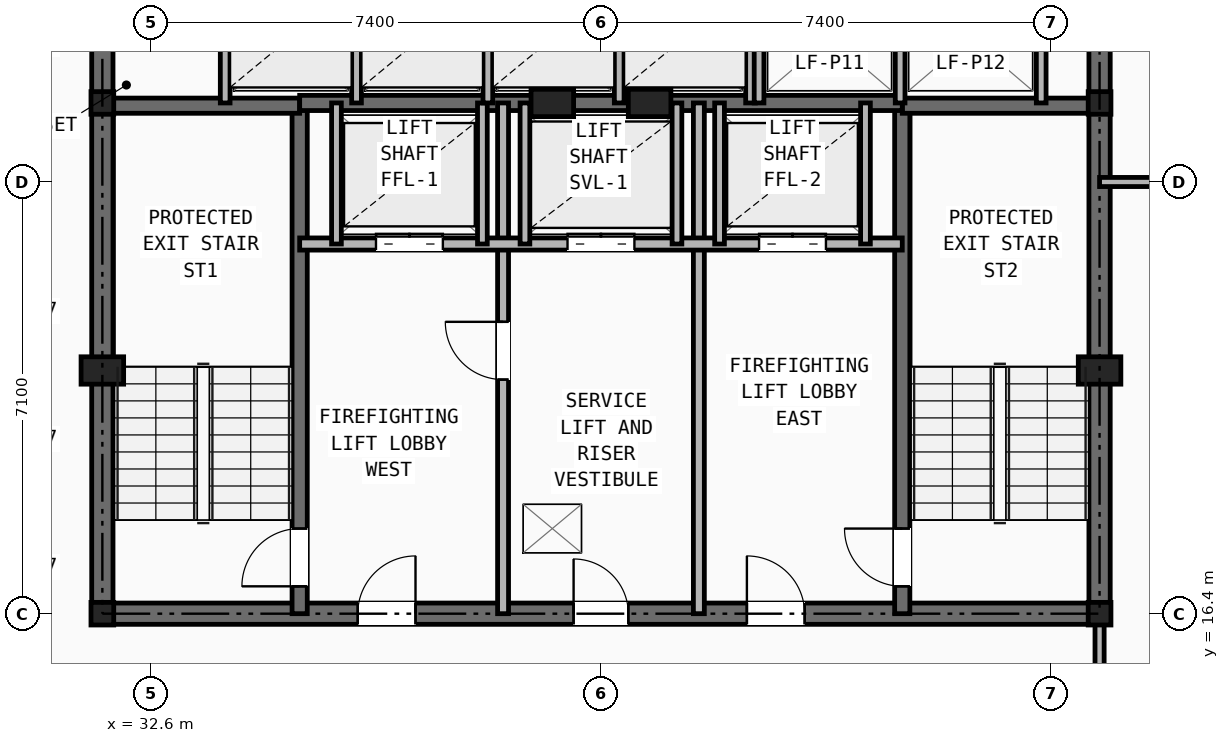
"""IFC4 building model, lengths in metres.
Left out: names, types, materials, properties, quantities, classifications, styles, units other than length and angle.
Written with IfcOpenShell. Run it as: python <this file> out.ifc"""

import sys

from ifc_helpers import new_model, si_unit, direction, frame, frame_2d, origin, origin_2d, place, context, subcontext, project, spatial, rectangle, i_section, extrude, element, fill, save


model = new_model("IFC4")
c1 = context("Model", 3, precision=1e-05, world=origin(), true_north=direction((0.0, 1.0)))
c2 = subcontext(c1, "Body", "Model", "MODEL_VIEW")
j1 = project(units=[si_unit("LENGTHUNIT", "METRE"), si_unit("PLANEANGLEUNIT", "RADIAN")], contexts=[c1])
p1 = place(None, origin())
s1 = spatial("IfcSite", under=j1, at=p1, CompositionType="ELEMENT")
p2 = place(p1, origin())
s2 = spatial("IfcBuilding", under=s1, at=p2, CompositionType="ELEMENT")
p3 = place(p2, frame((0.0, 0.0, 143.6)))
s3 = spatial("IfcBuildingStorey", under=s2, at=p3, CompositionType="ELEMENT", Elevation=143.6)
for number, where, z_axis, x_axis in (
    (1, (31.8, 16.4, 0.0), (0.0, 0.0, 1.0), (1.0, 0.0, 0.0)),
    (2, (48.2, 16.4, 0.0), (0.0, 0.0, 1.0), (1.0, 0.0, 0.0)),
    (3, (31.8, 24.8, 0.0), (0.0, 0.0, 1.0), (1.0, 0.0, 0.0)),
    (4, (48.2, 24.8, 0.0), (0.0, 0.0, 1.0), (1.0, 0.0, 0.0)),
):
    element("IfcColumn", number, at=place(p3, frame(where, z_axis=z_axis, x_axis=x_axis)), inside=s3, PredefinedType="COLUMN", context=c2, shape_type="SweptSolid", body=[
        extrude(i_section(OverallWidth=0.374, OverallDepth=0.372, WebThickness=0.016, FlangeThickness=0.026, at=origin_2d()), origin(), (0.0, 0.0, 1.0), 3.45),
    ])
for number, where, z_axis, x_axis in (
    (5, (31.8, 20.4, 0.0), (0.0, 0.0, 1.0), (1.0, 0.0, 0.0)),
    (6, (48.2, 20.4, 0.0), (0.0, 0.0, 1.0), (1.0, 0.0, 0.0)),
    (7, (39.2, 24.8, 0.0), (0.0, 0.0, 1.0), (1.0, 0.0, 0.0)),
    (8, (40.8, 24.8, 0.0), (0.0, 0.0, 1.0), (1.0, 0.0, 0.0)),
):
    element("IfcColumn", number, at=place(p3, frame(where, z_axis=z_axis, x_axis=x_axis)), inside=s3, PredefinedType="PILASTER", context=c2, shape_type="SweptSolid", body=[
        extrude(rectangle(XDim=0.7, YDim=0.45, at=origin_2d()), origin(), (0.0, 0.0, 1.0), 3.45),
    ])
p4 = place(p3, frame((31.8, 16.4, 0.0), z_axis=(0.0, 0.0, 1.0), x_axis=(1.0, 0.0, 0.0)))
e9 = element("IfcWall", 9, at=p4, inside=s3, PredefinedType="SHEAR", context=c2, shape_type="SweptSolid", body=[
    extrude(rectangle(XDim=16.4, YDim=0.35, at=frame_2d((8.2, 0.0))), origin(), (0.0, 0.0, 1.0), 3.21),
])
p5 = place(p4, frame((7.75, 0.0, 0.0)))
e10 = element("IfcOpeningElement", 10, at=p5, cuts=e9, PredefinedType="OPENING", context=c2, shape_type="SweptSolid", body=[
    extrude(rectangle(XDim=0.9, YDim=2.1, at=frame_2d((0.45, 1.05))), frame((0.0, 0.185, 0.0), z_axis=(0.0, -1.0, 0.0), x_axis=(1.0, 0.0, 0.0)), (0.0, 0.0, 1.0), 0.37),
])
p6 = place(p4, frame((4.2, 0.0, 0.0)))
e11 = element("IfcOpeningElement", 11, at=p6, cuts=e9, PredefinedType="OPENING", context=c2, shape_type="SweptSolid", body=[
    extrude(rectangle(XDim=0.95, YDim=2.1, at=frame_2d((0.475, 1.05))), frame((0.0, 0.185, 0.0), z_axis=(0.0, -1.0, 0.0), x_axis=(1.0, 0.0, 0.0)), (0.0, 0.0, 1.0), 0.37),
])
p7 = place(p4, frame((10.6, 0.0, 0.0)))
e12 = element("IfcOpeningElement", 12, at=p7, cuts=e9, PredefinedType="OPENING", context=c2, shape_type="SweptSolid", body=[
    extrude(rectangle(XDim=0.95, YDim=2.1, at=frame_2d((0.475, 1.05))), frame((0.0, 0.185, 0.0), z_axis=(0.0, -1.0, 0.0), x_axis=(1.0, 0.0, 0.0)), (0.0, 0.0, 1.0), 0.37),
])
p8 = place(p3, frame((31.8, 16.4, 0.0), z_axis=(0.0, 0.0, 1.0), x_axis=(0.0, 1.0, 0.0)))
e13 = element("IfcWall", 13, at=p8, inside=s3, PredefinedType="SHEAR", context=c2, shape_type="SweptSolid", body=[
    extrude(rectangle(XDim=14.8, YDim=0.35, at=frame_2d((7.4, 0.0))), origin(), (0.0, 0.0, 1.0), 3.21),
])
p9 = place(p8, frame((11.0, 0.0, 0.0)))
e14 = element("IfcOpeningElement", 14, at=p9, cuts=e13, PredefinedType="OPENING", context=c2, shape_type="SweptSolid", body=[
    extrude(rectangle(XDim=1.1, YDim=2.15, at=frame_2d((0.55, 1.075))), frame((0.0, 0.185, 0.0), z_axis=(0.0, -1.0, 0.0), x_axis=(1.0, 0.0, 0.0)), (0.0, 0.0, 1.0), 0.37),
])
p10 = place(p3, frame((48.2, 16.4, 0.0), z_axis=(0.0, 0.0, 1.0), x_axis=(0.0, 1.0, 0.0)))
e15 = element("IfcWall", 15, at=p10, inside=s3, PredefinedType="SHEAR", context=c2, shape_type="SweptSolid", body=[
    extrude(rectangle(XDim=14.8, YDim=0.35, at=frame_2d((7.4, 0.0))), origin(), (0.0, 0.0, 1.0), 3.21),
])
p11 = place(p10, frame((11.0, 0.0, 0.0)))
e16 = element("IfcOpeningElement", 16, at=p11, cuts=e15, PredefinedType="OPENING", context=c2, shape_type="SweptSolid", body=[
    extrude(rectangle(XDim=1.1, YDim=2.15, at=frame_2d((0.55, 1.075))), frame((0.0, 0.185, 0.0), z_axis=(0.0, -1.0, 0.0), x_axis=(1.0, 0.0, 0.0)), (0.0, 0.0, 1.0), 0.37),
])
p12 = place(p3, frame((35.045, 16.4, 0.0), z_axis=(0.0, 0.0, 1.0), x_axis=(0.0, 1.0, 0.0)))
e17 = element("IfcWall", 17, at=p12, inside=s3, PredefinedType="SHEAR", context=c2, shape_type="SweptSolid", body=[
    extrude(rectangle(XDim=8.4, YDim=0.25, at=frame_2d((4.2, 0.0))), origin(), (0.0, 0.0, 1.0), 3.21),
])
p13 = place(p12, frame((0.45, 0.0, 0.0)))
e18 = element("IfcOpeningElement", 18, at=p13, cuts=e17, PredefinedType="OPENING", context=c2, shape_type="SweptSolid", body=[
    extrude(rectangle(XDim=0.95, YDim=2.1, at=frame_2d((0.475, 1.05))), frame((0.0, 0.135, 0.0), z_axis=(0.0, -1.0, 0.0), x_axis=(1.0, 0.0, 0.0)), (0.0, 0.0, 1.0), 0.27),
])
p14 = place(p3, frame((31.8, 24.755, 0.0), z_axis=(0.0, 0.0, 1.0), x_axis=(1.0, 0.0, 0.0)))
e19 = element("IfcWall", 19, at=p14, inside=s3, PredefinedType="SHEAR", context=c2, shape_type="SweptSolid", body=[
    extrude(rectangle(XDim=3.245, YDim=0.25, at=frame_2d((1.623, 0.0))), origin(), (0.0, 0.0, 1.0), 3.21),
])
p15 = place(p3, frame((44.955, 16.4, 0.0), z_axis=(0.0, 0.0, 1.0), x_axis=(0.0, 1.0, 0.0)))
e20 = element("IfcWall", 20, at=p15, inside=s3, PredefinedType="SHEAR", context=c2, shape_type="SweptSolid", body=[
    extrude(rectangle(XDim=8.4, YDim=0.25, at=frame_2d((4.2, 0.0))), origin(), (0.0, 0.0, 1.0), 3.21),
])
p16 = place(p15, frame((0.45, 0.0, 0.0)))
e21 = element("IfcOpeningElement", 21, at=p16, cuts=e20, PredefinedType="OPENING", context=c2, shape_type="SweptSolid", body=[
    extrude(rectangle(XDim=0.95, YDim=2.1, at=frame_2d((0.475, 1.05))), frame((0.0, 0.135, 0.0), z_axis=(0.0, -1.0, 0.0), x_axis=(1.0, 0.0, 0.0)), (0.0, 0.0, 1.0), 0.27),
])
p17 = place(p3, frame((44.955, 24.755, 0.0), z_axis=(0.0, 0.0, 1.0), x_axis=(1.0, 0.0, 0.0)))
e22 = element("IfcWall", 22, at=p17, inside=s3, PredefinedType="SHEAR", context=c2, shape_type="SweptSolid", body=[
    extrude(rectangle(XDim=3.245, YDim=0.25, at=frame_2d((1.623, 0.0))), origin(), (0.0, 0.0, 1.0), 3.21),
])
p18 = place(p3, frame((35.045, 24.8, 0.0), z_axis=(0.0, 0.0, 1.0), x_axis=(1.0, 0.0, 0.0)))
e23 = element("IfcWall", 23, at=p18, inside=s3, PredefinedType="SHEAR", context=c2, shape_type="SweptSolid", body=[
    extrude(rectangle(XDim=9.91, YDim=0.25, at=frame_2d((4.955, 0.0))), origin(), (0.0, 0.0, 1.0), 3.21),
])
p19 = place(p3, frame((38.39, 16.4, 0.0), z_axis=(0.0, 0.0, 1.0), x_axis=(0.0, 1.0, 0.0)))
e24 = element("IfcWall", 24, at=p19, inside=s3, PredefinedType="PARTITIONING", context=c2, shape_type="SweptSolid", body=[
    extrude(rectangle(XDim=8.4, YDim=0.18, at=frame_2d((4.2, 0.0))), origin(), (0.0, 0.0, 1.0), 2.661),
])
p20 = place(p19, frame((3.85, 0.0, 0.0)))
e25 = element("IfcOpeningElement", 25, at=p20, cuts=e24, PredefinedType="OPENING", context=c2, shape_type="SweptSolid", body=[
    extrude(rectangle(XDim=0.95, YDim=2.1, at=frame_2d((0.475, 1.05))), frame((0.0, 0.1, 0.0), z_axis=(0.0, -1.0, 0.0), x_axis=(1.0, 0.0, 0.0)), (0.0, 0.0, 1.0), 0.2),
])
p21 = place(p3, frame((41.61, 16.4, 0.0), z_axis=(0.0, 0.0, 1.0), x_axis=(0.0, 1.0, 0.0)))
e26 = element("IfcWall", 26, at=p21, inside=s3, PredefinedType="PARTITIONING", context=c2, shape_type="SweptSolid", body=[
    extrude(rectangle(XDim=8.4, YDim=0.18, at=frame_2d((4.2, 0.0))), origin(), (0.0, 0.0, 1.0), 2.661),
])
p22 = place(p3, frame((35.045, 22.48, 0.0), z_axis=(0.0, 0.0, 1.0), x_axis=(1.0, 0.0, 0.0)))
e27 = element("IfcWall", 27, at=p22, inside=s3, PredefinedType="SOLIDWALL", context=c2, shape_type="SweptSolid", body=[
    extrude(rectangle(XDim=9.91, YDim=0.2, at=frame_2d((4.955, 0.0))), origin(), (0.0, 0.0, 1.0), 3.21),
])
p23 = place(p22, frame((1.255, 0.0, 0.0)))
e28 = element("IfcOpeningElement", 28, at=p23, cuts=e27, PredefinedType="OPENING", context=c2, shape_type="SweptSolid", body=[
    extrude(rectangle(XDim=1.1, YDim=2.15, at=frame_2d((0.55, 1.075))), frame((0.0, 0.11, 0.0), z_axis=(0.0, -1.0, 0.0), x_axis=(1.0, 0.0, 0.0)), (0.0, 0.0, 1.0), 0.22),
])
p24 = place(p22, frame((7.555, 0.0, 0.0)))
e29 = element("IfcOpeningElement", 29, at=p24, cuts=e27, PredefinedType="OPENING", context=c2, shape_type="SweptSolid", body=[
    extrude(rectangle(XDim=1.1, YDim=2.15, at=frame_2d((0.55, 1.075))), frame((0.0, 0.11, 0.0), z_axis=(0.0, -1.0, 0.0), x_axis=(1.0, 0.0, 0.0)), (0.0, 0.0, 1.0), 0.22),
])
p25 = place(p22, frame((4.405, 0.0, 0.0)))
e30 = element("IfcOpeningElement", 30, at=p25, cuts=e27, PredefinedType="OPENING", context=c2, shape_type="SweptSolid", body=[
    extrude(rectangle(XDim=1.1, YDim=2.15, at=frame_2d((0.55, 1.075))), frame((0.0, 0.11, 0.0), z_axis=(0.0, -1.0, 0.0), x_axis=(1.0, 0.0, 0.0)), (0.0, 0.0, 1.0), 0.22),
])
for number, where, z_axis, x_axis in (
    (31, (35.65, 22.48, 0.0), (0.0, 0.0, 1.0), (0.0, 1.0, 0.0)),
    (32, (38.05, 22.48, 0.0), (0.0, 0.0, 1.0), (0.0, 1.0, 0.0)),
    (33, (41.95, 22.48, 0.0), (0.0, 0.0, 1.0), (0.0, 1.0, 0.0)),
    (34, (44.35, 22.48, 0.0), (0.0, 0.0, 1.0), (0.0, 1.0, 0.0)),
    (35, (38.75, 22.48, 0.0), (0.0, 0.0, 1.0), (0.0, 1.0, 0.0)),
    (36, (41.25, 22.48, 0.0), (0.0, 0.0, 1.0), (0.0, 1.0, 0.0)),
):
    element("IfcWall", number, at=place(p3, frame(where, z_axis=z_axis, x_axis=x_axis)), inside=s3, PredefinedType="SOLIDWALL", context=c2, shape_type="SweptSolid", body=[
        extrude(rectangle(XDim=2.32, YDim=0.16, at=frame_2d((1.16, 0.0))), origin(), (0.0, 0.0, 1.0), 3.21),
    ])
for number, where, z_axis, x_axis in (
    (37, (33.82, 24.8, 0.0), (0.0, 0.0, 1.0), (0.0, 1.0, 0.0)),
    (38, (35.98, 24.8, 0.0), (0.0, 0.0, 1.0), (0.0, 1.0, 0.0)),
    (39, (38.14, 24.8, 0.0), (0.0, 0.0, 1.0), (0.0, 1.0, 0.0)),
    (40, (40.3, 24.8, 0.0), (0.0, 0.0, 1.0), (0.0, 1.0, 0.0)),
    (41, (42.46, 24.8, 0.0), (0.0, 0.0, 1.0), (0.0, 1.0, 0.0)),
    (42, (42.6, 24.8, 0.0), (0.0, 0.0, 1.0), (0.0, 1.0, 0.0)),
    (43, (44.92, 24.8, 0.0), (0.0, 0.0, 1.0), (0.0, 1.0, 0.0)),
    (44, (47.24, 24.8, 0.0), (0.0, 0.0, 1.0), (0.0, 1.0, 0.0)),
):
    element("IfcWall", number, at=place(p3, frame(where, z_axis=z_axis, x_axis=x_axis)), inside=s3, PredefinedType="SOLIDWALL", context=c2, shape_type="SweptSolid", body=[
        extrude(rectangle(XDim=2.08, YDim=0.16, at=frame_2d((1.04, 0.0))), origin(), (0.0, 0.0, 1.0), 3.21),
    ])
p26 = place(p3, frame((48.2, 14.1, 0.0), z_axis=(0.0, 0.0, 1.0), x_axis=(0.0, 1.0, 0.0)))
e45 = element("IfcWall", 45, at=p26, inside=s3, PredefinedType="PARTITIONING", context=c2, shape_type="SweptSolid", body=[
    extrude(rectangle(XDim=2.3, YDim=0.15, at=frame_2d((1.15, 0.0))), origin(), (0.0, 0.0, 1.0), 2.661),
])
p27 = place(p3, frame((48.2, 23.5, 0.0), z_axis=(0.0, 0.0, 1.0), x_axis=(1.0, 0.0, 0.0)))
e46 = element("IfcWall", 46, at=p27, inside=s3, PredefinedType="PARTITIONING", context=c2, shape_type="SweptSolid", body=[
    extrude(rectangle(XDim=12.933, YDim=0.15, at=frame_2d((6.467, 0.0))), origin(), (0.0, 0.0, 1.0), 2.589),
])
p28 = place(p27, frame((1.4, 0.0, 0.0)))
e47 = element("IfcOpeningElement", 47, at=p28, cuts=e46, PredefinedType="OPENING", context=c2, shape_type="SweptSolid", body=[
    extrude(rectangle(XDim=0.95, YDim=2.1, at=frame_2d((0.475, 1.05))), frame((0.0, 0.085, 0.0), z_axis=(0.0, -1.0, 0.0), x_axis=(1.0, 0.0, 0.0)), (0.0, 0.0, 1.0), 0.17),
])
p29 = place(p5, origin())
e48 = element("IfcDoor", 48, at=p29, inside=s3, OperationType="SINGLE_SWING_LEFT", PredefinedType="DOOR", context=c2, shape_type="SweptSolid", body=[
    extrude(rectangle(XDim=0.9, YDim=2.1, at=frame_2d((0.45, 1.05))), frame((0.0, 0.025, 0.0), z_axis=(0.0, -1.0, 0.0), x_axis=(1.0, 0.0, 0.0)), (0.0, 0.0, 1.0), 0.05),
])
fill(e10, e48)
p30 = place(p20, origin())
e49 = element("IfcDoor", 49, at=p30, inside=s3, OperationType="SINGLE_SWING_RIGHT", PredefinedType="DOOR", context=c2, shape_type="SweptSolid", body=[
    extrude(rectangle(XDim=0.95, YDim=2.1, at=frame_2d((0.475, 1.05))), frame((0.0, 0.025, 0.0), z_axis=(0.0, -1.0, 0.0), x_axis=(1.0, 0.0, 0.0)), (0.0, 0.0, 1.0), 0.05),
])
fill(e25, e49)
p31 = place(p13, origin())
e50 = element("IfcDoor", 50, at=p31, inside=s3, OperationType="SINGLE_SWING_LEFT", PredefinedType="DOOR", context=c2, shape_type="SweptSolid", body=[
    extrude(rectangle(XDim=0.95, YDim=2.1, at=frame_2d((0.475, 1.05))), frame((0.0, 0.025, 0.0), z_axis=(0.0, -1.0, 0.0), x_axis=(1.0, 0.0, 0.0)), (0.0, 0.0, 1.0), 0.05),
])
fill(e18, e50)
p32 = place(p16, origin())
e51 = element("IfcDoor", 51, at=p32, inside=s3, OperationType="SINGLE_SWING_RIGHT", PredefinedType="DOOR", context=c2, shape_type="SweptSolid", body=[
    extrude(rectangle(XDim=0.95, YDim=2.1, at=frame_2d((0.475, 1.05))), frame((0.0, 0.025, 0.0), z_axis=(0.0, -1.0, 0.0), x_axis=(1.0, 0.0, 0.0)), (0.0, 0.0, 1.0), 0.05),
])
fill(e21, e51)
p33 = place(p6, origin())
e52 = element("IfcDoor", 52, at=p33, inside=s3, OperationType="SINGLE_SWING_RIGHT", PredefinedType="DOOR", context=c2, shape_type="SweptSolid", body=[
    extrude(rectangle(XDim=0.95, YDim=2.1, at=frame_2d((0.475, 1.05))), frame((0.0, 0.025, 0.0), z_axis=(0.0, -1.0, 0.0), x_axis=(1.0, 0.0, 0.0)), (0.0, 0.0, 1.0), 0.05),
])
fill(e11, e52)
p34 = place(p7, origin())
e53 = element("IfcDoor", 53, at=p34, inside=s3, OperationType="SINGLE_SWING_LEFT", PredefinedType="DOOR", context=c2, shape_type="SweptSolid", body=[
    extrude(rectangle(XDim=0.95, YDim=2.1, at=frame_2d((0.475, 1.05))), frame((0.0, 0.025, 0.0), z_axis=(0.0, -1.0, 0.0), x_axis=(1.0, 0.0, 0.0)), (0.0, 0.0, 1.0), 0.05),
])
fill(e12, e53)
p35 = place(p23, origin())
e54 = element("IfcDoor", 54, at=p35, inside=s3, OperationType="DOUBLE_DOOR_SLIDING", PredefinedType="DOOR", context=c2, shape_type="SweptSolid", body=[
    extrude(rectangle(XDim=1.1, YDim=2.15, at=frame_2d((0.55, 1.075))), frame((0.0, 0.025, 0.0), z_axis=(0.0, -1.0, 0.0), x_axis=(1.0, 0.0, 0.0)), (0.0, 0.0, 1.0), 0.05),
])
fill(e28, e54)
p36 = place(p24, origin())
e55 = element("IfcDoor", 55, at=p36, inside=s3, OperationType="DOUBLE_DOOR_SLIDING", PredefinedType="DOOR", context=c2, shape_type="SweptSolid", body=[
    extrude(rectangle(XDim=1.1, YDim=2.15, at=frame_2d((0.55, 1.075))), frame((0.0, 0.025, 0.0), z_axis=(0.0, -1.0, 0.0), x_axis=(1.0, 0.0, 0.0)), (0.0, 0.0, 1.0), 0.05),
])
fill(e29, e55)
p37 = place(p25, origin())
e56 = element("IfcDoor", 56, at=p37, inside=s3, OperationType="DOUBLE_DOOR_SLIDING", PredefinedType="DOOR", context=c2, shape_type="SweptSolid", body=[
    extrude(rectangle(XDim=1.1, YDim=2.15, at=frame_2d((0.55, 1.075))), frame((0.0, 0.025, 0.0), z_axis=(0.0, -1.0, 0.0), x_axis=(1.0, 0.0, 0.0)), (0.0, 0.0, 1.0), 0.05),
])
fill(e30, e56)
save(model, sys.argv[1])
